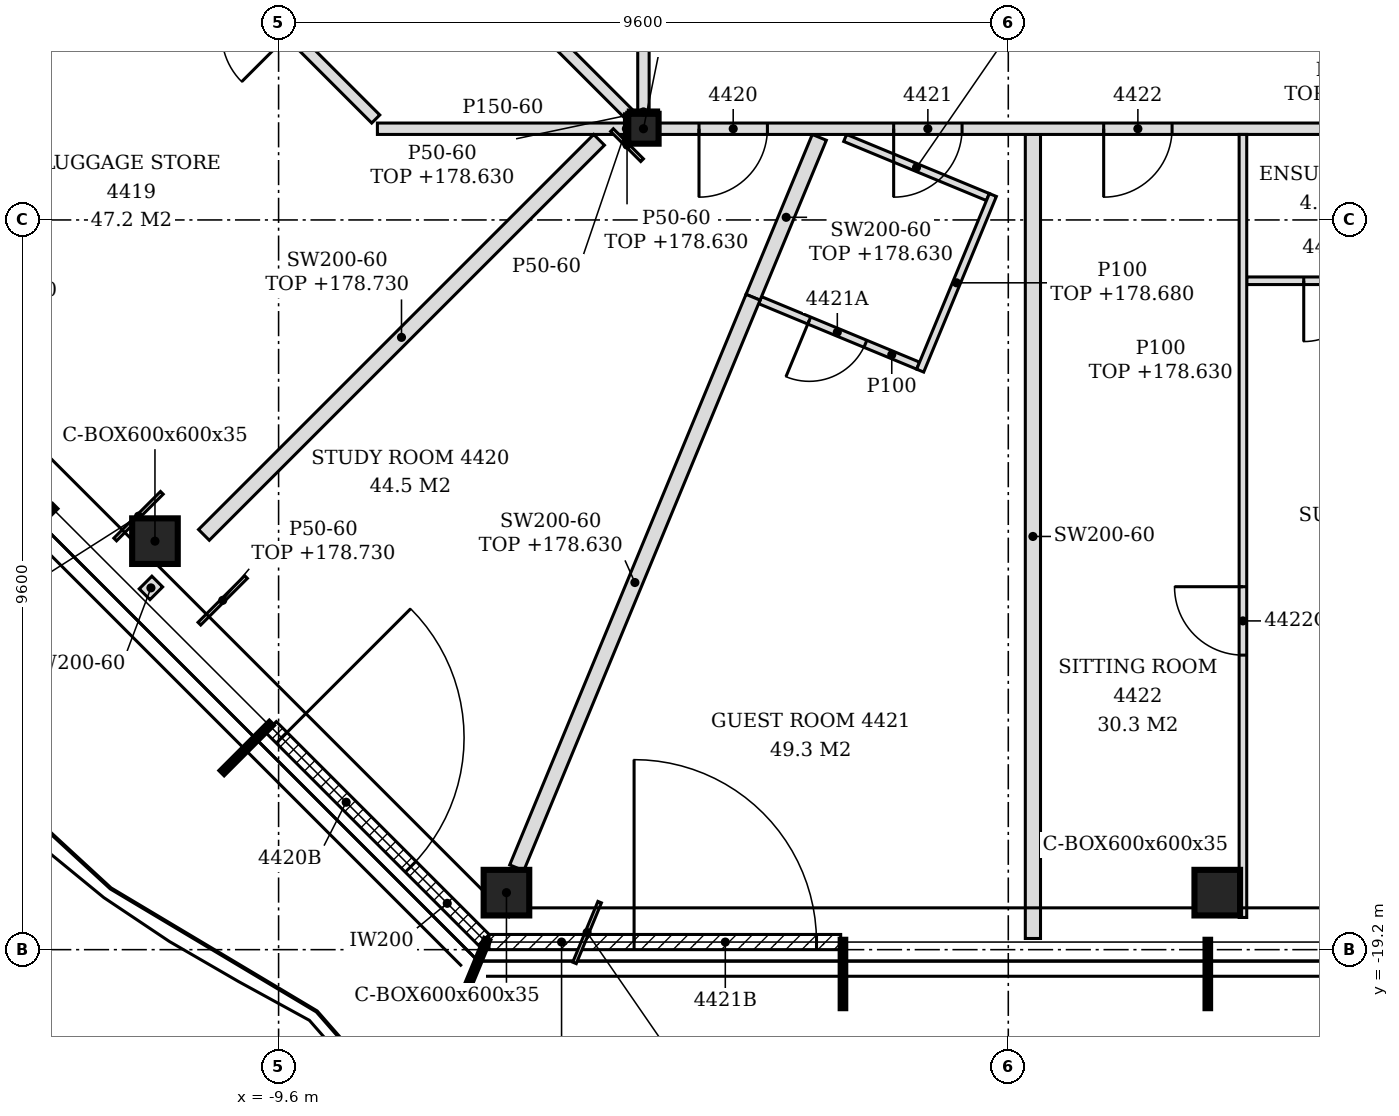
"""IFC4 building model, lengths in metres.
Left out: names, types, materials, properties, quantities, classifications, styles, units other than length and angle.
Written with IfcOpenShell. Run it as: python <this file> out.ifc"""

import sys

from ifc_helpers import new_model, si_unit, direction, frame, frame_2d, origin, origin_2d, place, context, subcontext, project, spatial, polyline, rectangle, hollow_rectangle, i_section, outline, extrude, clip, halfspace, element, fill, save


model = new_model("IFC4")
c1 = context("Model", 3, precision=1e-05, world=origin(), true_north=direction((0.0, 1.0)))
c2 = subcontext(c1, "Body", "Model", "MODEL_VIEW")
j1 = project(units=[si_unit("LENGTHUNIT", "METRE"), si_unit("PLANEANGLEUNIT", "RADIAN")], contexts=[c1])
p1 = place(None, origin())
s1 = spatial("IfcSite", under=j1, at=p1, CompositionType="ELEMENT")
p2 = place(p1, origin())
s2 = spatial("IfcBuilding", under=s1, at=p2, CompositionType="ELEMENT")
p3 = place(p2, frame((0.0, 0.0, 175.8)))
s3 = spatial("IfcBuildingStorey", under=s2, at=p3, CompositionType="ELEMENT", Elevation=175.8)
for number, where, z_axis, x_axis in (
    (1, (-6.602, -18.45, -0.15), (0.183, -0.122, 0.976), (0.555, 0.832, 0.0)),
    (2, (2.749, -18.45, -0.15), (0.183, -0.122, 0.976), (0.555, 0.832, 0.0)),
    (3, (-11.227, -13.826, -0.15), (0.183, -0.122, 0.976), (0.555, 0.832, 0.0)),
):
    element("IfcColumn", number, at=place(p3, frame(where, z_axis=z_axis, x_axis=x_axis)), inside=s3, PredefinedType="COLUMN", context=c2, shape_type="Clipping", body=[
        clip(clip(extrude(hollow_rectangle(XDim=0.6, YDim=0.6, WallThickness=0.035, at=origin_2d()), origin(), (0.0, 0.0, 1.0), 3.69), halfspace(frame((0.0, 0.0, 0.022), z_axis=(0.0, 0.0, 1.0), x_axis=(1.0, 0.0, 0.0)), True)), halfspace(frame((0.0, 0.0, 3.67), z_axis=(0.0, 0.0, 1.0), x_axis=(1.0, 0.0, 0.0)), False)),
    ])
p4 = place(p3, frame((-4.8, -8.4, -0.15), z_axis=(0.0, 0.0, 1.0), x_axis=(1.0, 0.0, 0.0)))
e4 = element("IfcColumn", 4, at=p4, inside=s3, PredefinedType="COLUMN", context=c2, shape_type="SweptSolid", body=[
    extrude(i_section(OverallWidth=0.399, OverallDepth=0.393, WebThickness=0.023, FlangeThickness=0.037, FilletRadius=0.015, at=origin_2d()), origin(), (0.0, 0.0, 1.0), 3.6),
])
p5 = place(p3, frame((-6.832, -19.1, 0.0), z_axis=(0.0, 0.0, 1.0), x_axis=(1.0, 0.0, 0.0)))
e5 = element("IfcWall", 5, at=p5, inside=s3, PredefinedType="NOTDEFINED", context=c2, shape_type="SweptSolid", body=[
    extrude(rectangle(XDim=4.626, YDim=0.2, at=frame_2d((2.313, 0.0))), origin(), (0.0, 0.0, 1.0), 2.95),
])
p6 = place(p5, frame((1.908, 0.0, 0.0)))
e6 = element("IfcOpeningElement", 6, at=p6, cuts=e5, PredefinedType="OPENING", context=c2, shape_type="SweptSolid", body=[
    extrude(rectangle(XDim=2.4, YDim=2.4, at=frame_2d((1.2, 1.2))), frame((0.0, 0.11, 0.0), z_axis=(0.0, -1.0, 0.0), x_axis=(1.0, 0.0, 0.0)), (0.0, 0.0, 1.0), 0.22),
])
p7 = place(p3, frame((-9.701, -16.271, 0.0), z_axis=(0.0, 0.0, 1.0), x_axis=(0.707106781187, -0.707106781187, 0.0)))
e7 = element("IfcWall", 7, at=p7, inside=s3, PredefinedType="NOTDEFINED", context=c2, shape_type="SweptSolid", body=[
    extrude(rectangle(XDim=3.962, YDim=0.2, at=frame_2d((1.981, 0.0))), origin(), (0.0, 0.0, 1.0), 3.45),
])
p8 = place(p7, frame((0.2, 0.0, 0.0)))
e8 = element("IfcOpeningElement", 8, at=p8, cuts=e7, PredefinedType="OPENING", context=c2, shape_type="SweptSolid", body=[
    extrude(rectangle(XDim=2.4, YDim=2.4, at=frame_2d((1.2, 1.2))), frame((0.0, 0.11, 0.0), z_axis=(0.0, -1.0, 0.0), x_axis=(1.0, 0.0, 0.0)), (0.0, 0.0, 1.0), 0.22),
])
p9 = place(p3, frame((0.324, -19.053, 0.0), z_axis=(0.0, 0.0, 1.0), x_axis=(0.0, 1.0, 0.0)))
e9 = element("IfcWall", 9, at=p9, inside=s3, PredefinedType="PARTITIONING", context=c2, shape_type="SweptSolid", body=[
    extrude(outline(polyline([(0.0, 0.0), (10.578, 0.0), (10.578, 2.83), (10.503, 2.83), (10.501, 3.45), (8.958, 3.45), (8.956, 2.88), (8.748, 2.88), (8.746, 3.45), (4.158, 3.45), (4.156, 2.88), (3.948, 2.88), (3.946, 3.45), (0.303, 3.45), (0.301, 2.93), (0.003, 2.93), (0.001, 3.45), (0.0, 3.45), (0.0, 0.0)])), frame((0.0, 0.1, 0.0), z_axis=(0.0, -1.0, 0.0), x_axis=(1.0, 0.0, 0.0)), (0.0, 0.0, 1.0), 0.2),
])
p10 = place(p3, frame((3.087, -18.777, 0.0), z_axis=(0.0, 0.0, 1.0), x_axis=(0.0, 1.0, 0.0)))
e10 = element("IfcWall", 10, at=p10, inside=s3, PredefinedType="PARTITIONING", context=c2, shape_type="SweptSolid", body=[
    extrude(outline(polyline([(0.495, 0.0), (10.302, 0.0), (10.302, 0.863), (10.302, 1.725), (10.302, 2.587), (10.302, 2.83), (0.252, 2.83), (0.35, 2.587), (0.495, 1.725), (0.495, 0.863), (0.495, 0.0)])), frame((0.0, 0.05, 0.0), z_axis=(0.0, -1.0, 0.0), x_axis=(1.0, 0.0, 0.0)), (0.0, 0.0, 1.0), 0.1),
])
p11 = place(p10, frame((3.452, 0.0, 0.0)))
e11 = element("IfcOpeningElement", 11, at=p11, cuts=e10, PredefinedType="OPENING", context=c2, shape_type="SweptSolid", body=[
    extrude(rectangle(XDim=0.9, YDim=2.1, at=frame_2d((0.45, 1.05))), frame((0.0, 0.06, 0.0), z_axis=(0.0, -1.0, 0.0), x_axis=(1.0, 0.0, 0.0)), (0.0, 0.0, 1.0), 0.12),
])
p12 = place(p3, frame((-6.467, -18.123, 0.0), z_axis=(0.0, 0.0, 1.0), x_axis=(0.382668510089, 0.923885713379, 0.0)))
e12 = element("IfcWall", 12, at=p12, inside=s3, PredefinedType="PARTITIONING", context=c2, shape_type="SweptSolid", body=[
    extrude(rectangle(XDim=8.124, YDim=0.2, at=frame_2d((4.062, 0.0))), origin(), (0.0, 0.0, 1.0), 2.83),
])
p13 = place(p3, frame((-11.363, -14.524, 0.0), z_axis=(0.0, 0.0, 1.0), x_axis=(0.70762537781, 0.706587803942, 0.0)))
e13 = element("IfcWall", 13, at=p13, inside=s3, PredefinedType="PARTITIONING", context=c2, shape_type="SweptSolid", body=[
    extrude(rectangle(XDim=0.235, YDim=0.2, at=frame_2d((0.118, 0.0))), origin(), (0.0, 0.0, 1.0), 3.45),
])
p14 = place(p3, frame((-10.583, -13.743, 0.0), z_axis=(0.0, 0.0, 1.0), x_axis=(0.707173198016, 0.707040358118, 0.0)))
e14 = element("IfcWall", 14, at=p14, inside=s3, PredefinedType="PARTITIONING", context=c2, shape_type="SweptSolid", body=[
    extrude(rectangle(XDim=7.351, YDim=0.2, at=frame_2d((3.676, 0.0))), origin(), (0.0, 0.0, 1.0), 2.93),
])
p15 = place(p3, frame((-1.159, -11.582, 0.0), z_axis=(0.0, 0.0, 1.0), x_axis=(0.382423652519, 0.923987094062, 0.0)))
e15 = element("IfcWall", 15, at=p15, inside=s3, PredefinedType="PARTITIONING", context=c2, shape_type="SweptSolid", body=[
    extrude(rectangle(XDim=2.501, YDim=0.1, at=frame_2d((1.25, 0.0))), origin(), (0.0, 0.0, 1.0), 2.88),
])
p16 = place(p3, frame((-1.186, -11.517, 0.0), z_axis=(0.0, 0.0, 1.0), x_axis=(-0.923835689206, 0.382789262323, 0.0)))
e16 = element("IfcWall", 16, at=p16, inside=s3, PredefinedType="PARTITIONING", context=c2, shape_type="SweptSolid", body=[
    extrude(rectangle(XDim=2.251, YDim=0.1, at=frame_2d((1.125, 0.0))), origin(), (0.0, 0.0, 1.0), 3.45),
])
p17 = place(p16, frame((0.751, 0.0, 0.0)))
e17 = element("IfcOpeningElement", 17, at=p17, cuts=e16, PredefinedType="OPENING", context=c2, shape_type="SweptSolid", body=[
    extrude(rectangle(XDim=0.8, YDim=2.1, at=frame_2d((0.4, 1.05))), frame((0.0, 0.06, 0.0), z_axis=(0.0, -1.0, 0.0), x_axis=(1.0, 0.0, 0.0)), (0.0, 0.0, 1.0), 0.12),
])
p18 = place(p3, frame((-3.358, -10.617, 0.0), z_axis=(0.0, 0.0, 1.0), x_axis=(0.382840979218, 0.923814258729, 0.0)))
e18 = element("IfcWall", 18, at=p18, inside=s3, PredefinedType="PARTITIONING", context=c2, shape_type="SweptSolid", body=[
    extrude(rectangle(XDim=2.277, YDim=0.2, at=frame_2d((1.139, 0.0))), origin(), (0.0, 0.0, 1.0), 2.83),
])
p19 = place(p3, frame((3.137, -10.4, 0.0), z_axis=(0.0, 0.0, 1.0), x_axis=(1.0, 0.0, 0.0)))
e19 = element("IfcWall", 19, at=p19, inside=s3, PredefinedType="PARTITIONING", context=c2, shape_type="SweptSolid", body=[
    extrude(rectangle(XDim=2.4, YDim=0.1, at=frame_2d((1.2, 0.0))), origin(), (0.0, 0.0, 1.0), 3.45),
])
p20 = place(p19, frame((0.75, 0.0, 0.0)))
e20 = element("IfcOpeningElement", 20, at=p20, cuts=e19, PredefinedType="OPENING", context=c2, shape_type="SweptSolid", body=[
    extrude(rectangle(XDim=0.8, YDim=2.1, at=frame_2d((0.4, 1.05))), frame((0.0, 0.06, 0.0), z_axis=(0.0, -1.0, 0.0), x_axis=(1.0, 0.0, 0.0)), (0.0, 0.0, 1.0), 0.12),
])
p21 = place(p3, frame((-0.268, -9.299, 0.0), z_axis=(0.0, 0.0, 1.0), x_axis=(-0.923927543828, 0.382567502222, 0.0)))
e21 = element("IfcWall", 21, at=p21, inside=s3, PredefinedType="PARTITIONING", context=c2, shape_type="SweptSolid", body=[
    extrude(rectangle(XDim=2.032, YDim=0.1, at=frame_2d((1.016, 0.0))), origin(), (0.0, 0.0, 1.0), 2.83),
])
p22 = place(p3, frame((-15.206, -9.119, 0.0), z_axis=(0.0, 0.0, 1.0), x_axis=(0.70719733142, 0.707016219356, 0.0)))
e22 = element("IfcWall", 22, at=p22, inside=s3, PredefinedType="PARTITIONING", context=c2, shape_type="SweptSolid", body=[
    extrude(rectangle(XDim=5.392, YDim=0.2, at=frame_2d((2.696, 0.0))), origin(), (0.0, 0.0, 1.0), 2.83),
])
p23 = place(p3, frame((-8.3, -8.4, 0.0), z_axis=(0.0, 0.0, 1.0), x_axis=(1.0, 0.0, 0.0)))
e23 = element("IfcWall", 23, at=p23, inside=s3, PredefinedType="PARTITIONING", context=c2, shape_type="SweptSolid", body=[
    extrude(rectangle(XDim=3.301, YDim=0.15, at=frame_2d((1.65, 0.0))), origin(), (0.0, 0.0, 1.0), 3.45),
])
p24 = place(p3, frame((-4.601, -8.4, 0.0), z_axis=(0.0, 0.0, 1.0), x_axis=(1.0, 0.0, 0.0)))
e24 = element("IfcWall", 24, at=p24, inside=s3, PredefinedType="PARTITIONING", context=c2, shape_type="SweptSolid", body=[
    extrude(rectangle(XDim=11.601, YDim=0.15, at=frame_2d((5.801, 0.0))), origin(), (0.0, 0.0, 1.0), 2.83),
])
p25 = place(p24, frame((0.531, 0.0, 0.0)))
e25 = element("IfcOpeningElement", 25, at=p25, cuts=e24, PredefinedType="OPENING", context=c2, shape_type="SweptSolid", body=[
    extrude(rectangle(XDim=0.9, YDim=2.1, at=frame_2d((0.45, 1.05))), frame((0.0, 0.085, 0.0), z_axis=(0.0, -1.0, 0.0), x_axis=(1.0, 0.0, 0.0)), (0.0, 0.0, 1.0), 0.17),
])
p26 = place(p24, frame((3.093, 0.0, 0.0)))
e26 = element("IfcOpeningElement", 26, at=p26, cuts=e24, PredefinedType="OPENING", context=c2, shape_type="SweptSolid", body=[
    extrude(rectangle(XDim=0.9, YDim=2.1, at=frame_2d((0.45, 1.05))), frame((0.0, 0.085, 0.0), z_axis=(0.0, -1.0, 0.0), x_axis=(1.0, 0.0, 0.0)), (0.0, 0.0, 1.0), 0.17),
])
p27 = place(p24, frame((5.855, 0.0, 0.0)))
e27 = element("IfcOpeningElement", 27, at=p27, cuts=e24, PredefinedType="OPENING", context=c2, shape_type="SweptSolid", body=[
    extrude(rectangle(XDim=0.9, YDim=2.1, at=frame_2d((0.45, 1.05))), frame((0.0, 0.085, 0.0), z_axis=(0.0, -1.0, 0.0), x_axis=(1.0, 0.0, 0.0)), (0.0, 0.0, 1.0), 0.17),
])
p28 = place(p3, frame((-8.322, -8.272, 0.0), z_axis=(0.0, 0.0, 1.0), x_axis=(-0.707106781187, 0.707106781187, 0.0)))
e28 = element("IfcWall", 28, at=p28, inside=s3, PredefinedType="PARTITIONING", context=c2, shape_type="SweptSolid", body=[
    extrude(rectangle(XDim=8.415, YDim=0.15, at=frame_2d((4.207, 0.0))), origin(), (0.0, 0.0, 1.0), 2.83),
])
p29 = place(p28, frame((5.515, 0.0, 0.0)))
e29 = element("IfcOpeningElement", 29, at=p29, cuts=e28, PredefinedType="OPENING", context=c2, shape_type="SweptSolid", body=[
    extrude(rectangle(XDim=0.9, YDim=2.1, at=frame_2d((0.45, 1.05))), frame((0.0, 0.085, 0.0), z_axis=(0.0, -1.0, 0.0), x_axis=(1.0, 0.0, 0.0)), (0.0, 0.0, 1.0), 0.17),
])
p30 = place(p28, frame((1.594, 0.0, 0.0)))
e30 = element("IfcOpeningElement", 30, at=p30, cuts=e28, PredefinedType="OPENING", context=c2, shape_type="SweptSolid", body=[
    extrude(rectangle(XDim=0.9, YDim=2.1, at=frame_2d((0.45, 1.05))), frame((0.0, 0.085, 0.0), z_axis=(0.0, -1.0, 0.0), x_axis=(1.0, 0.0, 0.0)), (0.0, 0.0, 1.0), 0.17),
])
p31 = place(p3, frame((-4.998, -8.202, 0.0), z_axis=(0.0, 0.0, 1.0), x_axis=(-0.707106781187, 0.707106781187, 0.0)))
e31 = element("IfcWall", 31, at=p31, inside=s3, PredefinedType="PARTITIONING", context=c2, shape_type="SweptSolid", body=[
    extrude(rectangle(XDim=6.327, YDim=0.15, at=frame_2d((3.164, 0.0))), origin(), (0.0, 0.0, 1.0), 2.93),
])
p32 = place(p31, frame((2.664, 0.0, 0.0)))
e32 = element("IfcOpeningElement", 32, at=p32, cuts=e31, PredefinedType="OPENING", context=c2, shape_type="SweptSolid", body=[
    extrude(rectangle(XDim=0.9, YDim=2.1, at=frame_2d((0.45, 1.05))), frame((0.0, 0.085, 0.0), z_axis=(0.0, -1.0, 0.0), x_axis=(1.0, 0.0, 0.0)), (0.0, 0.0, 1.0), 0.17),
])
p33 = place(p3, frame((-4.8, -8.204, 0.0), z_axis=(0.0, 0.0, 1.0), x_axis=(0.0, 1.0, 0.0)))
e33 = element("IfcWall", 33, at=p33, inside=s3, PredefinedType="PARTITIONING", context=c2, shape_type="SweptSolid", body=[
    extrude(rectangle(XDim=4.529, YDim=0.15, at=frame_2d((2.264, 0.0))), origin(), (0.0, 0.0, 1.0), 2.83),
])
p34 = place(p3, frame((-5.707, -19.374, 0.0), z_axis=(0.0, 0.0, 1.0), x_axis=(0.382551127662, 0.923934323815, 0.0)))
e34 = element("IfcWall", 34, at=p34, inside=s3, PredefinedType="PARTITIONING", context=c2, shape_type="SweptSolid", body=[
    extrude(rectangle(XDim=0.865, YDim=0.05, at=frame_2d((0.433, 0.0))), origin(), (0.0, 0.0, 1.0), 2.93),
])
p35 = place(p3, frame((-10.642, -14.911, 0.0), z_axis=(0.0, 0.0, 1.0), x_axis=(0.707106781187, 0.707106781187, 0.0)))
e35 = element("IfcWall", 35, at=p35, inside=s3, PredefinedType="PARTITIONING", context=c2, shape_type="SweptSolid", body=[
    extrude(rectangle(XDim=0.868, YDim=0.05, at=frame_2d((0.434, 0.0))), origin(), (0.0, 0.0, 1.0), 2.93),
])
p36 = place(p3, frame((-11.75, -13.804, 0.0), z_axis=(0.0, 0.0, 1.0), x_axis=(0.707247373047, 0.706966161367, 0.0)))
e36 = element("IfcWall", 36, at=p36, inside=s3, PredefinedType="PARTITIONING", context=c2, shape_type="SweptSolid", body=[
    extrude(rectangle(XDim=0.868, YDim=0.05, at=frame_2d((0.434, 0.0))), origin(), (0.0, 0.0, 1.0), 2.63),
])
p37 = place(p3, frame((-5.0, -8.178, 0.0), z_axis=(0.0, 0.0, 1.0), x_axis=(1.0, 0.0, 0.0)))
e37 = element("IfcWall", 37, at=p37, inside=s3, PredefinedType="PARTITIONING", context=c2, shape_type="SweptSolid", body=[
    extrude(rectangle(XDim=0.399, YDim=0.05, at=frame_2d((0.199, 0.0))), origin(), (0.0, 0.0, 1.0), 2.83),
])
p38 = place(p3, frame((-4.818, -8.814, 0.0), z_axis=(0.0, 0.0, 1.0), x_axis=(-0.707106781187, 0.707106781187, 0.0)))
e38 = element("IfcWall", 38, at=p38, inside=s3, PredefinedType="PARTITIONING", context=c2, shape_type="SweptSolid", body=[
    extrude(rectangle(XDim=0.56, YDim=0.05, at=frame_2d((0.28, 0.0))), origin(), (0.0, 0.0, 1.0), 2.83),
])
p39 = place(p3, frame((-5.024, -8.596, 0.0), z_axis=(0.0, 0.0, 1.0), x_axis=(0.0, 1.0, 0.0)))
e39 = element("IfcWall", 39, at=p39, inside=s3, PredefinedType="PARTITIONING", context=c2, shape_type="SweptSolid", body=[
    extrude(rectangle(XDim=0.393, YDim=0.05, at=frame_2d((0.196, 0.0))), origin(), (0.0, 0.0, 1.0), 3.45),
])
p40 = place(p6, origin())
e40 = element("IfcDoor", 40, at=p40, inside=s3, OperationType="SINGLE_SWING_LEFT", PredefinedType="DOOR", context=c2, shape_type="SweptSolid", body=[
    extrude(rectangle(XDim=2.4, YDim=2.4, at=frame_2d((1.2, 1.2))), frame((0.0, 0.025, 0.0), z_axis=(0.0, -1.0, 0.0), x_axis=(1.0, 0.0, 0.0)), (0.0, 0.0, 1.0), 0.05),
])
fill(e6, e40)
p41 = place(p8, origin())
e41 = element("IfcDoor", 41, at=p41, inside=s3, OperationType="SINGLE_SWING_LEFT", PredefinedType="DOOR", context=c2, shape_type="SweptSolid", body=[
    extrude(rectangle(XDim=2.4, YDim=2.4, at=frame_2d((1.2, 1.2))), frame((0.0, 0.025, 0.0), z_axis=(0.0, -1.0, 0.0), x_axis=(1.0, 0.0, 0.0)), (0.0, 0.0, 1.0), 0.05),
])
fill(e8, e41)
p42 = place(p25, frame((0.9, 0.0, 0.0), z_axis=(0.0, 0.0, 1.0), x_axis=(-1.0, 0.0, 0.0)))
e42 = element("IfcDoor", 42, at=p42, inside=s3, OperationType="SINGLE_SWING_RIGHT", PredefinedType="DOOR", context=c2, shape_type="SweptSolid", body=[
    extrude(rectangle(XDim=0.9, YDim=2.1, at=frame_2d((0.45, 1.05))), frame((0.0, 0.025, 0.0), z_axis=(0.0, -1.0, 0.0), x_axis=(1.0, 0.0, 0.0)), (0.0, 0.0, 1.0), 0.05),
])
fill(e25, e42)
p43 = place(p26, frame((0.9, 0.0, 0.0), z_axis=(0.0, 0.0, 1.0), x_axis=(-1.0, 0.0, 0.0)))
e43 = element("IfcDoor", 43, at=p43, inside=s3, OperationType="SINGLE_SWING_RIGHT", PredefinedType="DOOR", context=c2, shape_type="SweptSolid", body=[
    extrude(rectangle(XDim=0.9, YDim=2.1, at=frame_2d((0.45, 1.05))), frame((0.0, 0.025, 0.0), z_axis=(0.0, -1.0, 0.0), x_axis=(1.0, 0.0, 0.0)), (0.0, 0.0, 1.0), 0.05),
])
fill(e26, e43)
p44 = place(p17, origin())
e44 = element("IfcDoor", 44, at=p44, inside=s3, OperationType="SINGLE_SWING_RIGHT", PredefinedType="DOOR", context=c2, shape_type="SweptSolid", body=[
    extrude(rectangle(XDim=0.8, YDim=2.1, at=frame_2d((0.4, 1.05))), frame((0.0, 0.025, 0.0), z_axis=(0.0, -1.0, 0.0), x_axis=(1.0, 0.0, 0.0)), (0.0, 0.0, 1.0), 0.05),
])
fill(e17, e44)
p45 = place(p27, frame((0.9, 0.0, 0.0), z_axis=(0.0, 0.0, 1.0), x_axis=(-1.0, 0.0, 0.0)))
e45 = element("IfcDoor", 45, at=p45, inside=s3, OperationType="SINGLE_SWING_RIGHT", PredefinedType="DOOR", context=c2, shape_type="SweptSolid", body=[
    extrude(rectangle(XDim=0.9, YDim=2.1, at=frame_2d((0.45, 1.05))), frame((0.0, 0.025, 0.0), z_axis=(0.0, -1.0, 0.0), x_axis=(1.0, 0.0, 0.0)), (0.0, 0.0, 1.0), 0.05),
])
fill(e27, e45)
p46 = place(p11, origin())
e46 = element("IfcDoor", 46, at=p46, inside=s3, OperationType="SINGLE_SWING_RIGHT", PredefinedType="DOOR", context=c2, shape_type="SweptSolid", body=[
    extrude(rectangle(XDim=0.9, YDim=2.1, at=frame_2d((0.45, 1.05))), frame((0.0, 0.025, 0.0), z_axis=(0.0, -1.0, 0.0), x_axis=(1.0, 0.0, 0.0)), (0.0, 0.0, 1.0), 0.05),
])
fill(e11, e46)
p47 = place(p20, frame((0.8, 0.0, 0.0), z_axis=(0.0, 0.0, 1.0), x_axis=(-1.0, 0.0, 0.0)))
e47 = element("IfcDoor", 47, at=p47, inside=s3, OperationType="SINGLE_SWING_RIGHT", PredefinedType="DOOR", context=c2, shape_type="SweptSolid", body=[
    extrude(rectangle(XDim=0.8, YDim=2.1, at=frame_2d((0.4, 1.05))), frame((0.0, 0.025, 0.0), z_axis=(0.0, -1.0, 0.0), x_axis=(1.0, 0.0, 0.0)), (0.0, 0.0, 1.0), 0.05),
])
fill(e20, e47)
save(model, sys.argv[1])
